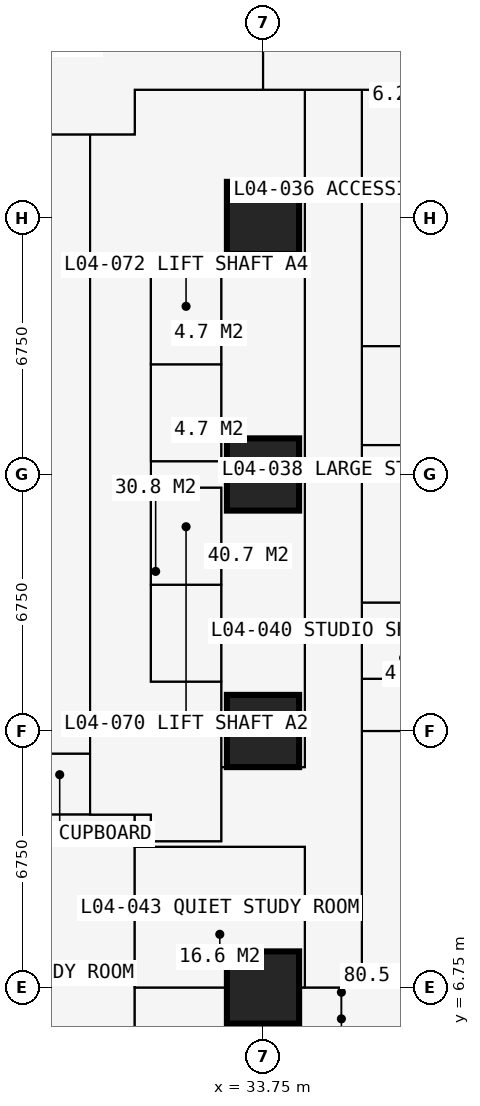
"""IFC4 building model, lengths in metres.
Left out: names, types, materials, properties, quantities, classifications, styles, units other than length and angle.
Written with IfcOpenShell. Run it as: python <this file> out.ifc"""

import sys

from ifc_helpers import new_model, si_unit, direction, frame, frame_2d, origin, origin_2d, place, context, subcontext, project, spatial, rectangle, extrude, element, fill, save


model = new_model("IFC4")
c1 = context("Model", 3, precision=1e-05, world=origin(), true_north=direction((0.0, 1.0)))
c2 = subcontext(c1, "Body", "Model", "MODEL_VIEW")
j1 = project(units=[si_unit("LENGTHUNIT", "METRE"), si_unit("PLANEANGLEUNIT", "RADIAN")], contexts=[c1])
p1 = place(None, origin())
s1 = spatial("IfcSite", under=j1, at=p1, CompositionType="ELEMENT")
p2 = place(p1, origin())
s2 = spatial("IfcBuilding", under=s1, at=p2, CompositionType="ELEMENT")
p3 = place(p2, frame((0.0, 0.0, 18.0)))
s3 = spatial("IfcBuildingStorey", under=s2, at=p3, CompositionType="ELEMENT", Elevation=18.0)
for number, where, z_axis, x_axis in (
    (1, (33.75, 6.75, 0.0), (0.0, 0.0, 1.0), (1.0, 0.0, 0.0)),
    (2, (33.75, 13.5, 0.0), (0.0, 0.0, 1.0), (1.0, 0.0, 0.0)),
    (3, (33.75, 20.25, 0.0), (0.0, 0.0, 1.0), (1.0, 0.0, 0.0)),
    (4, (33.75, 27.0, 0.0), (0.0, 0.0, 1.0), (1.0, 0.0, 0.0)),
):
    element("IfcColumn", number, at=place(p3, frame(where, z_axis=z_axis, x_axis=x_axis)), inside=s3, PredefinedType="COLUMN", context=c2, shape_type="SweptSolid", body=[
        extrude(rectangle(XDim=1.9, YDim=1.9, at=origin_2d()), origin(), (0.0, 0.0, 1.0), 3.6),
    ])
p4 = place(p3, frame((10.125, 11.3, 0.0), z_axis=(0.0, 0.0, 1.0), x_axis=(1.0, 0.0, 0.0)))
e5 = element("IfcWall", 5, at=p4, inside=s3, PredefinedType="PARTITIONING", context=c2, shape_type="SweptSolid", body=[
    extrude(rectangle(XDim=20.675, YDim=0.15, at=frame_2d((10.337, 0.0))), origin(), (0.0, 0.0, 1.0), 3.375),
])
p5 = place(p4, frame((8.375, 0.0, 0.0)))
e6 = element("IfcOpeningElement", 6, at=p5, cuts=e5, PredefinedType="OPENING", context=c2, shape_type="SweptSolid", body=[
    extrude(rectangle(XDim=1.0, YDim=2.2, at=frame_2d((0.5, 1.1))), frame((0.0, 0.085, 0.0), z_axis=(0.0, -1.0, 0.0), x_axis=(1.0, 0.0, 0.0)), (0.0, 0.0, 1.0), 0.17),
])
p6 = place(p4, frame((10.975, 0.0, 0.0)))
e7 = element("IfcOpeningElement", 7, at=p6, cuts=e5, PredefinedType="OPENING", context=c2, shape_type="SweptSolid", body=[
    extrude(rectangle(XDim=1.0, YDim=2.2, at=frame_2d((0.5, 1.1))), frame((0.0, 0.085, 0.0), z_axis=(0.0, -1.0, 0.0), x_axis=(1.0, 0.0, 0.0)), (0.0, 0.0, 1.0), 0.17),
])
p7 = place(p4, frame((3.925, 0.0, 0.0)))
e8 = element("IfcOpeningElement", 8, at=p7, cuts=e5, PredefinedType="OPENING", context=c2, shape_type="SweptSolid", body=[
    extrude(rectangle(XDim=0.95, YDim=2.2, at=frame_2d((0.475, 1.1))), frame((0.0, 0.085, 0.0), z_axis=(0.0, -1.0, 0.0), x_axis=(1.0, 0.0, 0.0)), (0.0, 0.0, 1.0), 0.17),
])
p8 = place(p3, frame((11.3, 29.2, 0.0), z_axis=(0.0, 0.0, 1.0), x_axis=(1.0, 0.0, 0.0)))
e9 = element("IfcWall", 9, at=p8, inside=s3, PredefinedType="PARTITIONING", context=c2, shape_type="SweptSolid", body=[
    extrude(rectangle(XDim=19.075, YDim=0.15, at=frame_2d((9.538, 0.0))), origin(), (0.0, 0.0, 1.0), 3.375),
])
p9 = place(p8, frame((10.137, 0.0, 0.0)))
e10 = element("IfcOpeningElement", 10, at=p9, cuts=e9, PredefinedType="OPENING", context=c2, shape_type="SweptSolid", body=[
    extrude(rectangle(XDim=1.0, YDim=2.2, at=frame_2d((0.5, 1.1))), frame((0.0, 0.085, 0.0), z_axis=(0.0, -1.0, 0.0), x_axis=(1.0, 0.0, 0.0)), (0.0, 0.0, 1.0), 0.17),
])
p10 = place(p3, frame((27.6, 12.9, 0.0), z_axis=(0.0, 0.0, 1.0), x_axis=(1.0, 0.0, 0.0)))
e11 = element("IfcWall", 11, at=p10, inside=s3, PredefinedType="PARTITIONING", context=c2, shape_type="SweptSolid", body=[
    extrude(rectangle(XDim=1.6, YDim=0.15, at=frame_2d((0.8, 0.0))), origin(), (0.0, 0.0, 1.0), 2.877),
])
p11 = place(p3, frame((29.2, 11.3, 0.0), z_axis=(0.0, 0.0, 1.0), x_axis=(0.0, 1.0, 0.0)))
e12 = element("IfcWall", 12, at=p11, inside=s3, PredefinedType="PARTITIONING", context=c2, shape_type="SweptSolid", body=[
    extrude(rectangle(XDim=17.9, YDim=0.2, at=frame_2d((8.95, 0.0))), origin(), (0.0, 0.0, 1.0), 3.375),
])
p12 = place(p11, frame((8.35, 0.0, 0.0)))
e13 = element("IfcOpeningElement", 13, at=p12, cuts=e12, PredefinedType="OPENING", context=c2, shape_type="SweptSolid", body=[
    extrude(rectangle(XDim=1.2, YDim=2.2, at=frame_2d((0.6, 1.1))), frame((0.0, 0.11, 0.0), z_axis=(0.0, -1.0, 0.0), x_axis=(1.0, 0.0, 0.0)), (0.0, 0.0, 1.0), 0.22),
])
p13 = place(p3, frame((29.2, 25.7, 0.0), z_axis=(0.0, 0.0, 1.0), x_axis=(1.0, 0.0, 0.0)))
e14 = element("IfcWall", 14, at=p13, inside=s3, PredefinedType="SHEAR", context=c2, shape_type="SweptSolid", body=[
    extrude(rectangle(XDim=3.45, YDim=0.1, at=frame_2d((1.725, 0.0))), origin(), (0.0, 0.0, 1.0), 3.375),
])
p14 = place(p3, frame((30.375, -0.734, 0.0), z_axis=(0.0, 0.0, 1.0), x_axis=(0.0, 1.0, 0.0)))
e15 = element("IfcWall", 15, at=p14, inside=s3, PredefinedType="PARTITIONING", context=c2, shape_type="SweptSolid", body=[
    extrude(rectangle(XDim=12.034, YDim=0.15, at=frame_2d((6.017, 0.0))), origin(), (0.0, 0.0, 1.0), 3.375),
])
p15 = place(p14, frame((5.134, 0.0, 0.0)))
e16 = element("IfcOpeningElement", 16, at=p15, cuts=e15, PredefinedType="OPENING", context=c2, shape_type="SweptSolid", body=[
    extrude(rectangle(XDim=1.0, YDim=2.2, at=frame_2d((0.5, 1.1))), frame((0.0, 0.085, 0.0), z_axis=(0.0, -1.0, 0.0), x_axis=(1.0, 0.0, 0.0)), (0.0, 0.0, 1.0), 0.17),
])
p16 = place(p3, frame((30.375, 6.75, 0.0), z_axis=(0.0, 0.0, 1.0), x_axis=(1.0, 0.0, 0.0)))
e17 = element("IfcWall", 17, at=p16, inside=s3, PredefinedType="PARTITIONING", context=c2, shape_type="SweptSolid", body=[
    extrude(rectangle(XDim=5.975, YDim=0.15, at=frame_2d((2.988, 0.0))), origin(), (0.0, 0.0, 1.0), 2.877),
])
p17 = place(p3, frame((30.375, 10.45, 0.0), z_axis=(0.0, 0.0, 1.0), x_axis=(1.0, 0.0, 0.0)))
e18 = element("IfcWall", 18, at=p17, inside=s3, PredefinedType="PARTITIONING", context=c2, shape_type="SweptSolid", body=[
    extrude(rectangle(XDim=4.475, YDim=0.15, at=frame_2d((2.238, 0.0))), origin(), (0.0, 0.0, 1.0), 3.375),
])
p18 = place(p17, frame((2.35, 0.0, 0.0)))
e19 = element("IfcOpeningElement", 19, at=p18, cuts=e18, PredefinedType="OPENING", context=c2, shape_type="SweptSolid", body=[
    extrude(rectangle(XDim=0.95, YDim=2.2, at=frame_2d((0.475, 1.1))), frame((0.0, 0.085, 0.0), z_axis=(0.0, -1.0, 0.0), x_axis=(1.0, 0.0, 0.0)), (0.0, 0.0, 1.0), 0.17),
])
p19 = place(p3, frame((30.375, 29.2, 0.0), z_axis=(0.0, 0.0, 1.0), x_axis=(0.0, 1.0, 0.0)))
e20 = element("IfcWall", 20, at=p19, inside=s3, PredefinedType="PARTITIONING", context=c2, shape_type="SweptSolid", body=[
    extrude(rectangle(XDim=1.175, YDim=0.15, at=frame_2d((0.587, 0.0))), origin(), (0.0, 0.0, 1.0), 3.375),
])
p20 = place(p3, frame((30.375, 30.375, 0.0), z_axis=(0.0, 0.0, 1.0), x_axis=(1.0, 0.0, 0.0)))
e21 = element("IfcWall", 21, at=p20, inside=s3, PredefinedType="PARTITIONING", context=c2, shape_type="SweptSolid", body=[
    extrude(rectangle(XDim=10.859, YDim=0.15, at=frame_2d((5.429, 0.0))), origin(), (0.0, 0.0, 1.0), 3.375),
])
p21 = place(p20, frame((4.725, 0.0, 0.0)))
e22 = element("IfcOpeningElement", 22, at=p21, cuts=e21, PredefinedType="OPENING", context=c2, shape_type="SweptSolid", body=[
    extrude(rectangle(XDim=1.0, YDim=2.2, at=frame_2d((0.5, 1.1))), frame((0.0, 0.085, 0.0), z_axis=(0.0, -1.0, 0.0), x_axis=(1.0, 0.0, 0.0)), (0.0, 0.0, 1.0), 0.17),
])
p22 = place(p3, frame((30.8, 10.6, 0.0), z_axis=(0.0, 0.0, 1.0), x_axis=(0.0, 1.0, 0.0)))
e23 = element("IfcWall", 23, at=p22, inside=s3, PredefinedType="PARTITIONING", context=c2, shape_type="SweptSolid", body=[
    extrude(rectangle(XDim=0.7, YDim=0.15, at=frame_2d((0.35, 0.0))), origin(), (0.0, 0.0, 1.0), 3.375),
])
p23 = place(p3, frame((30.8, 10.6, 0.0), z_axis=(0.0, 0.0, 1.0), x_axis=(1.0, 0.0, 0.0)))
e24 = element("IfcWall", 24, at=p23, inside=s3, PredefinedType="PARTITIONING", context=c2, shape_type="SweptSolid", body=[
    extrude(rectangle(XDim=1.85, YDim=0.15, at=frame_2d((0.925, 0.0))), origin(), (0.0, 0.0, 1.0), 3.375),
])
p24 = place(p3, frame((30.8, 14.8, 0.0), z_axis=(0.0, 0.0, 1.0), x_axis=(0.0, 1.0, 0.0)))
e25 = element("IfcWall", 25, at=p24, inside=s3, PredefinedType="PARTITIONING", context=c2, shape_type="SweptSolid", body=[
    extrude(rectangle(XDim=10.9, YDim=0.15, at=frame_2d((5.45, 0.0))), origin(), (0.0, 0.0, 1.0), 3.375),
])
p25 = place(p24, frame((0.75, 0.0, 0.0)))
e26 = element("IfcOpeningElement", 26, at=p25, cuts=e25, PredefinedType="OPENING", context=c2, shape_type="SweptSolid", body=[
    extrude(rectangle(XDim=1.1, YDim=2.2, at=frame_2d((0.55, 1.1))), frame((0.0, 0.085, 0.0), z_axis=(0.0, -1.0, 0.0), x_axis=(1.0, 0.0, 0.0)), (0.0, 0.0, 1.0), 0.17),
])
p26 = place(p24, frame((3.25, 0.0, 0.0)))
e27 = element("IfcOpeningElement", 27, at=p26, cuts=e25, PredefinedType="OPENING", context=c2, shape_type="SweptSolid", body=[
    extrude(rectangle(XDim=1.1, YDim=2.2, at=frame_2d((0.55, 1.1))), frame((0.0, 0.085, 0.0), z_axis=(0.0, -1.0, 0.0), x_axis=(1.0, 0.0, 0.0)), (0.0, 0.0, 1.0), 0.17),
])
p27 = place(p24, frame((6.5, 0.0, 0.0)))
e28 = element("IfcOpeningElement", 28, at=p27, cuts=e25, PredefinedType="OPENING", context=c2, shape_type="SweptSolid", body=[
    extrude(rectangle(XDim=1.1, YDim=2.2, at=frame_2d((0.55, 1.1))), frame((0.0, 0.085, 0.0), z_axis=(0.0, -1.0, 0.0), x_axis=(1.0, 0.0, 0.0)), (0.0, 0.0, 1.0), 0.17),
])
p28 = place(p24, frame((9.05, 0.0, 0.0)))
e29 = element("IfcOpeningElement", 29, at=p28, cuts=e25, PredefinedType="OPENING", context=c2, shape_type="SweptSolid", body=[
    extrude(rectangle(XDim=1.1, YDim=2.2, at=frame_2d((0.55, 1.1))), frame((0.0, 0.085, 0.0), z_axis=(0.0, -1.0, 0.0), x_axis=(1.0, 0.0, 0.0)), (0.0, 0.0, 1.0), 0.17),
])
for number, where, z_axis, x_axis in (
    (30, (30.8, 14.8, 0.0), (0.0, 0.0, 1.0), (1.0, 0.0, 0.0)),
    (31, (30.8, 17.35, 0.0), (0.0, 0.0, 1.0), (1.0, 0.0, 0.0)),
    (32, (30.8, 19.9, 0.0), (0.0, 0.0, 1.0), (1.0, 0.0, 0.0)),
    (33, (30.8, 20.6, 0.0), (0.0, 0.0, 1.0), (1.0, 0.0, 0.0)),
    (34, (30.8, 23.15, 0.0), (0.0, 0.0, 1.0), (1.0, 0.0, 0.0)),
):
    element("IfcWall", number, at=place(p3, frame(where, z_axis=z_axis, x_axis=x_axis)), inside=s3, PredefinedType="SHEAR", context=c2, shape_type="SweptSolid", body=[
        extrude(rectangle(XDim=1.85, YDim=0.1, at=frame_2d((0.925, 0.0))), origin(), (0.0, 0.0, 1.0), 3.375),
    ])
p29 = place(p3, frame((32.65, 10.6, 0.0), z_axis=(0.0, 0.0, 1.0), x_axis=(0.0, 1.0, 0.0)))
e35 = element("IfcWall", 35, at=p29, inside=s3, PredefinedType="SHEAR", context=c2, shape_type="SweptSolid", body=[
    extrude(rectangle(XDim=9.3, YDim=0.1, at=frame_2d((4.65, 0.0))), origin(), (0.0, 0.0, 1.0), 3.375),
])
p30 = place(p29, frame((0.5, 0.0, 0.0)))
e36 = element("IfcOpeningElement", 36, at=p30, cuts=e35, PredefinedType="OPENING", context=c2, shape_type="SweptSolid", body=[
    extrude(rectangle(XDim=1.0, YDim=2.2, at=frame_2d((0.5, 1.1))), frame((0.0, 0.06, 0.0), z_axis=(0.0, -1.0, 0.0), x_axis=(1.0, 0.0, 0.0)), (0.0, 0.0, 1.0), 0.12),
])
p31 = place(p3, frame((32.65, 12.55, 0.0), z_axis=(0.0, 0.0, 1.0), x_axis=(1.0, 0.0, 0.0)))
e37 = element("IfcWall", 37, at=p31, inside=s3, PredefinedType="PARTITIONING", context=c2, shape_type="SweptSolid", body=[
    extrude(rectangle(XDim=2.2, YDim=0.15, at=frame_2d((1.1, 0.0))), origin(), (0.0, 0.0, 1.0), 3.375),
])
p32 = place(p3, frame((32.65, 20.6, 0.0), z_axis=(0.0, 0.0, 1.0), x_axis=(0.0, 1.0, 0.0)))
e38 = element("IfcWall", 38, at=p32, inside=s3, PredefinedType="PARTITIONING", context=c2, shape_type="SweptSolid", body=[
    extrude(rectangle(XDim=5.1, YDim=0.15, at=frame_2d((2.55, 0.0))), origin(), (0.0, 0.0, 1.0), 3.375),
])
p33 = place(p3, frame((33.75, 30.375, 0.0), z_axis=(0.0, 0.0, 1.0), x_axis=(0.0, 1.0, 0.0)))
e39 = element("IfcWall", 39, at=p33, inside=s3, PredefinedType="PARTITIONING", context=c2, shape_type="SweptSolid", body=[
    extrude(rectangle(XDim=5.975, YDim=0.15, at=frame_2d((2.988, 0.0))), origin(), (0.0, 0.0, 1.0), 2.877),
])
p34 = place(p3, frame((34.85, 6.75, 0.0), z_axis=(0.0, 0.0, 1.0), x_axis=(0.0, 1.0, 0.0)))
e40 = element("IfcWall", 40, at=p34, inside=s3, PredefinedType="PARTITIONING", context=c2, shape_type="SweptSolid", body=[
    extrude(rectangle(XDim=3.7, YDim=0.15, at=frame_2d((1.85, 0.0))), origin(), (0.0, 0.0, 1.0), 3.375),
])
p35 = place(p3, frame((34.85, 12.55, 0.0), z_axis=(0.0, 0.0, 1.0), x_axis=(0.0, 1.0, 0.0)))
e41 = element("IfcWall", 41, at=p35, inside=s3, PredefinedType="PARTITIONING", context=c2, shape_type="SweptSolid", body=[
    extrude(rectangle(XDim=17.825, YDim=0.15, at=frame_2d((8.913, 0.0))), origin(), (0.0, 0.0, 1.0), 3.375),
])
p36 = place(p35, frame((8.65, 0.0, 0.0)))
e42 = element("IfcOpeningElement", 42, at=p36, cuts=e41, PredefinedType="OPENING", context=c2, shape_type="SweptSolid", body=[
    extrude(rectangle(XDim=0.95, YDim=2.2, at=frame_2d((0.475, 1.1))), frame((0.0, 0.085, 0.0), z_axis=(0.0, -1.0, 0.0), x_axis=(1.0, 0.0, 0.0)), (0.0, 0.0, 1.0), 0.17),
])
p37 = place(p3, frame((36.35, 6.75, 0.0), z_axis=(0.0, 0.0, 1.0), x_axis=(0.0, 1.0, 0.0)))
e43 = element("IfcWall", 43, at=p37, inside=s3, PredefinedType="PARTITIONING", context=c2, shape_type="SweptSolid", body=[
    extrude(rectangle(XDim=23.625, YDim=0.15, at=frame_2d((11.812, 0.0))), origin(), (0.0, 0.0, 1.0), 3.375),
])
p38 = place(p37, frame((18.475, 0.0, 0.0)))
e44 = element("IfcOpeningElement", 44, at=p38, cuts=e43, PredefinedType="OPENING", context=c2, shape_type="SweptSolid", body=[
    extrude(rectangle(XDim=0.95, YDim=2.2, at=frame_2d((0.475, 1.1))), frame((0.0, 0.085, 0.0), z_axis=(0.0, -1.0, 0.0), x_axis=(1.0, 0.0, 0.0)), (0.0, 0.0, 1.0), 0.17),
])
p39 = place(p37, frame((11.725, 0.0, 0.0)))
e45 = element("IfcOpeningElement", 45, at=p39, cuts=e43, PredefinedType="OPENING", context=c2, shape_type="SweptSolid", body=[
    extrude(rectangle(XDim=0.95, YDim=2.2, at=frame_2d((0.475, 1.1))), frame((0.0, 0.085, 0.0), z_axis=(0.0, -1.0, 0.0), x_axis=(1.0, 0.0, 0.0)), (0.0, 0.0, 1.0), 0.17),
])
p40 = place(p37, frame((6.95, 0.0, 0.0)))
e46 = element("IfcOpeningElement", 46, at=p40, cuts=e43, PredefinedType="OPENING", context=c2, shape_type="SweptSolid", body=[
    extrude(rectangle(XDim=0.95, YDim=2.2, at=frame_2d((0.475, 1.1))), frame((0.0, 0.085, 0.0), z_axis=(0.0, -1.0, 0.0), x_axis=(1.0, 0.0, 0.0)), (0.0, 0.0, 1.0), 0.17),
])
p41 = place(p3, frame((36.35, 13.5, 0.0), z_axis=(0.0, 0.0, 1.0), x_axis=(1.0, 0.0, 0.0)))
e47 = element("IfcWall", 47, at=p41, inside=s3, PredefinedType="PARTITIONING", context=c2, shape_type="SweptSolid", body=[
    extrude(rectangle(XDim=4.884, YDim=0.15, at=frame_2d((2.442, 0.0))), origin(), (0.0, 0.0, 1.0), 2.877),
])
p42 = place(p3, frame((36.35, 14.875, 0.0), z_axis=(0.0, 0.0, 1.0), x_axis=(1.0, 0.0, 0.0)))
e48 = element("IfcWall", 48, at=p42, inside=s3, PredefinedType="PARTITIONING", context=c2, shape_type="SweptSolid", body=[
    extrude(rectangle(XDim=2.2, YDim=0.1, at=frame_2d((1.1, 0.0))), origin(), (0.0, 0.0, 1.0), 3.375),
])
p43 = place(p3, frame((36.35, 16.875, 0.0), z_axis=(0.0, 0.0, 1.0), x_axis=(1.0, 0.0, 0.0)))
e49 = element("IfcWall", 49, at=p43, inside=s3, PredefinedType="PARTITIONING", context=c2, shape_type="SweptSolid", body=[
    extrude(rectangle(XDim=4.884, YDim=0.175, at=frame_2d((2.442, 0.0))), origin(), (0.0, 0.0, 1.0), 3.375),
])
p44 = place(p43, frame((0.65, 0.0, 0.0)))
e50 = element("IfcOpeningElement", 50, at=p44, cuts=e49, PredefinedType="OPENING", context=c2, shape_type="SweptSolid", body=[
    extrude(rectangle(XDim=0.9, YDim=2.2, at=frame_2d((0.45, 1.1))), frame((0.0, 0.097, 0.0), z_axis=(0.0, -1.0, 0.0), x_axis=(1.0, 0.0, 0.0)), (0.0, 0.0, 1.0), 0.195),
])
p45 = place(p3, frame((36.35, 21.025, 0.0), z_axis=(0.0, 0.0, 1.0), x_axis=(1.0, 0.0, 0.0)))
e51 = element("IfcWall", 51, at=p45, inside=s3, PredefinedType="PARTITIONING", context=c2, shape_type="SweptSolid", body=[
    extrude(rectangle(XDim=2.4, YDim=0.1, at=frame_2d((1.2, 0.0))), origin(), (0.0, 0.0, 1.0), 3.375),
])
p46 = place(p3, frame((36.35, 23.625, 0.0), z_axis=(0.0, 0.0, 1.0), x_axis=(1.0, 0.0, 0.0)))
e52 = element("IfcWall", 52, at=p46, inside=s3, PredefinedType="PARTITIONING", context=c2, shape_type="SweptSolid", body=[
    extrude(rectangle(XDim=4.884, YDim=0.175, at=frame_2d((2.442, 0.0))), origin(), (0.0, 0.0, 1.0), 3.375),
])
p47 = place(p46, frame((0.75, 0.0, 0.0)))
e53 = element("IfcOpeningElement", 53, at=p47, cuts=e52, PredefinedType="OPENING", context=c2, shape_type="SweptSolid", body=[
    extrude(rectangle(XDim=0.9, YDim=2.2, at=frame_2d((0.45, 1.1))), frame((0.0, 0.097, 0.0), z_axis=(0.0, -1.0, 0.0), x_axis=(1.0, 0.0, 0.0)), (0.0, 0.0, 1.0), 0.195),
])
p48 = place(p3, frame((36.35, 27.775, 0.0), z_axis=(0.0, 0.0, 1.0), x_axis=(1.0, 0.0, 0.0)))
e54 = element("IfcWall", 54, at=p48, inside=s3, PredefinedType="PARTITIONING", context=c2, shape_type="SweptSolid", body=[
    extrude(rectangle(XDim=2.4, YDim=0.1, at=frame_2d((1.2, 0.0))), origin(), (0.0, 0.0, 1.0), 3.375),
])
p49 = place(p38, origin())
e55 = element("IfcDoor", 55, at=p49, inside=s3, OperationType="SINGLE_SWING_LEFT", PredefinedType="DOOR", context=c2, shape_type="SweptSolid", body=[
    extrude(rectangle(XDim=0.95, YDim=2.2, at=frame_2d((0.475, 1.1))), frame((0.0, 0.025, 0.0), z_axis=(0.0, -1.0, 0.0), x_axis=(1.0, 0.0, 0.0)), (0.0, 0.0, 1.0), 0.05),
])
fill(e44, e55)
p50 = place(p39, origin())
e56 = element("IfcDoor", 56, at=p50, inside=s3, OperationType="SINGLE_SWING_LEFT", PredefinedType="DOOR", context=c2, shape_type="SweptSolid", body=[
    extrude(rectangle(XDim=0.95, YDim=2.2, at=frame_2d((0.475, 1.1))), frame((0.0, 0.025, 0.0), z_axis=(0.0, -1.0, 0.0), x_axis=(1.0, 0.0, 0.0)), (0.0, 0.0, 1.0), 0.05),
])
fill(e45, e56)
p51 = place(p47, origin())
e57 = element("IfcDoor", 57, at=p51, inside=s3, OperationType="SINGLE_SWING_RIGHT", PredefinedType="DOOR", context=c2, shape_type="SweptSolid", body=[
    extrude(rectangle(XDim=0.9, YDim=2.2, at=frame_2d((0.45, 1.1))), frame((0.0, 0.025, 0.0), z_axis=(0.0, -1.0, 0.0), x_axis=(1.0, 0.0, 0.0)), (0.0, 0.0, 1.0), 0.05),
])
fill(e53, e57)
p52 = place(p40, origin())
e58 = element("IfcDoor", 58, at=p52, inside=s3, OperationType="SINGLE_SWING_LEFT", PredefinedType="DOOR", context=c2, shape_type="SweptSolid", body=[
    extrude(rectangle(XDim=0.95, YDim=2.2, at=frame_2d((0.475, 1.1))), frame((0.0, 0.025, 0.0), z_axis=(0.0, -1.0, 0.0), x_axis=(1.0, 0.0, 0.0)), (0.0, 0.0, 1.0), 0.05),
])
fill(e46, e58)
p53 = place(p44, origin())
e59 = element("IfcDoor", 59, at=p53, inside=s3, OperationType="SINGLE_SWING_RIGHT", PredefinedType="DOOR", context=c2, shape_type="SweptSolid", body=[
    extrude(rectangle(XDim=0.9, YDim=2.2, at=frame_2d((0.45, 1.1))), frame((0.0, 0.025, 0.0), z_axis=(0.0, -1.0, 0.0), x_axis=(1.0, 0.0, 0.0)), (0.0, 0.0, 1.0), 0.05),
])
fill(e50, e59)
p54 = place(p30, origin())
e60 = element("IfcDoor", 60, at=p54, inside=s3, OperationType="SINGLE_SWING_LEFT", PredefinedType="DOOR", context=c2, shape_type="SweptSolid", body=[
    extrude(rectangle(XDim=1.0, YDim=2.2, at=frame_2d((0.5, 1.1))), frame((0.0, 0.025, 0.0), z_axis=(0.0, -1.0, 0.0), x_axis=(1.0, 0.0, 0.0)), (0.0, 0.0, 1.0), 0.05),
])
fill(e36, e60)
p55 = place(p36, origin())
e61 = element("IfcDoor", 61, at=p55, inside=s3, OperationType="SINGLE_SWING_LEFT", PredefinedType="DOOR", context=c2, shape_type="SweptSolid", body=[
    extrude(rectangle(XDim=0.95, YDim=2.2, at=frame_2d((0.475, 1.1))), frame((0.0, 0.025, 0.0), z_axis=(0.0, -1.0, 0.0), x_axis=(1.0, 0.0, 0.0)), (0.0, 0.0, 1.0), 0.05),
])
fill(e42, e61)
p56 = place(p18, origin())
e62 = element("IfcDoor", 62, at=p56, inside=s3, OperationType="SINGLE_SWING_LEFT", PredefinedType="DOOR", context=c2, shape_type="SweptSolid", body=[
    extrude(rectangle(XDim=0.95, YDim=2.2, at=frame_2d((0.475, 1.1))), frame((0.0, 0.025, 0.0), z_axis=(0.0, -1.0, 0.0), x_axis=(1.0, 0.0, 0.0)), (0.0, 0.0, 1.0), 0.05),
])
fill(e19, e62)
p57 = place(p21, origin())
e63 = element("IfcDoor", 63, at=p57, inside=s3, OperationType="SINGLE_SWING_LEFT", PredefinedType="DOOR", context=c2, shape_type="SweptSolid", body=[
    extrude(rectangle(XDim=1.0, YDim=2.2, at=frame_2d((0.5, 1.1))), frame((0.0, 0.025, 0.0), z_axis=(0.0, -1.0, 0.0), x_axis=(1.0, 0.0, 0.0)), (0.0, 0.0, 1.0), 0.05),
])
fill(e22, e63)
p58 = place(p25, origin())
e64 = element("IfcDoor", 64, at=p58, inside=s3, OperationType="DOUBLE_DOOR_SLIDING", PredefinedType="DOOR", context=c2, shape_type="SweptSolid", body=[
    extrude(rectangle(XDim=1.1, YDim=2.2, at=frame_2d((0.55, 1.1))), frame((0.0, 0.025, 0.0), z_axis=(0.0, -1.0, 0.0), x_axis=(1.0, 0.0, 0.0)), (0.0, 0.0, 1.0), 0.05),
])
fill(e26, e64)
p59 = place(p26, origin())
e65 = element("IfcDoor", 65, at=p59, inside=s3, OperationType="DOUBLE_DOOR_SLIDING", PredefinedType="DOOR", context=c2, shape_type="SweptSolid", body=[
    extrude(rectangle(XDim=1.1, YDim=2.2, at=frame_2d((0.55, 1.1))), frame((0.0, 0.025, 0.0), z_axis=(0.0, -1.0, 0.0), x_axis=(1.0, 0.0, 0.0)), (0.0, 0.0, 1.0), 0.05),
])
fill(e27, e65)
p60 = place(p27, origin())
e66 = element("IfcDoor", 66, at=p60, inside=s3, OperationType="DOUBLE_DOOR_SLIDING", PredefinedType="DOOR", context=c2, shape_type="SweptSolid", body=[
    extrude(rectangle(XDim=1.1, YDim=2.2, at=frame_2d((0.55, 1.1))), frame((0.0, 0.025, 0.0), z_axis=(0.0, -1.0, 0.0), x_axis=(1.0, 0.0, 0.0)), (0.0, 0.0, 1.0), 0.05),
])
fill(e28, e66)
p61 = place(p28, origin())
e67 = element("IfcDoor", 67, at=p61, inside=s3, OperationType="DOUBLE_DOOR_SLIDING", PredefinedType="DOOR", context=c2, shape_type="SweptSolid", body=[
    extrude(rectangle(XDim=1.1, YDim=2.2, at=frame_2d((0.55, 1.1))), frame((0.0, 0.025, 0.0), z_axis=(0.0, -1.0, 0.0), x_axis=(1.0, 0.0, 0.0)), (0.0, 0.0, 1.0), 0.05),
])
fill(e29, e67)
p62 = place(p12, origin())
e68 = element("IfcDoor", 68, at=p62, inside=s3, OperationType="DOUBLE_DOOR_SINGLE_SWING", PredefinedType="DOOR", context=c2, shape_type="SweptSolid", body=[
    extrude(rectangle(XDim=1.2, YDim=2.2, at=frame_2d((0.6, 1.1))), frame((0.0, 0.025, 0.0), z_axis=(0.0, -1.0, 0.0), x_axis=(1.0, 0.0, 0.0)), (0.0, 0.0, 1.0), 0.05),
])
fill(e13, e68)
save(model, sys.argv[1])
